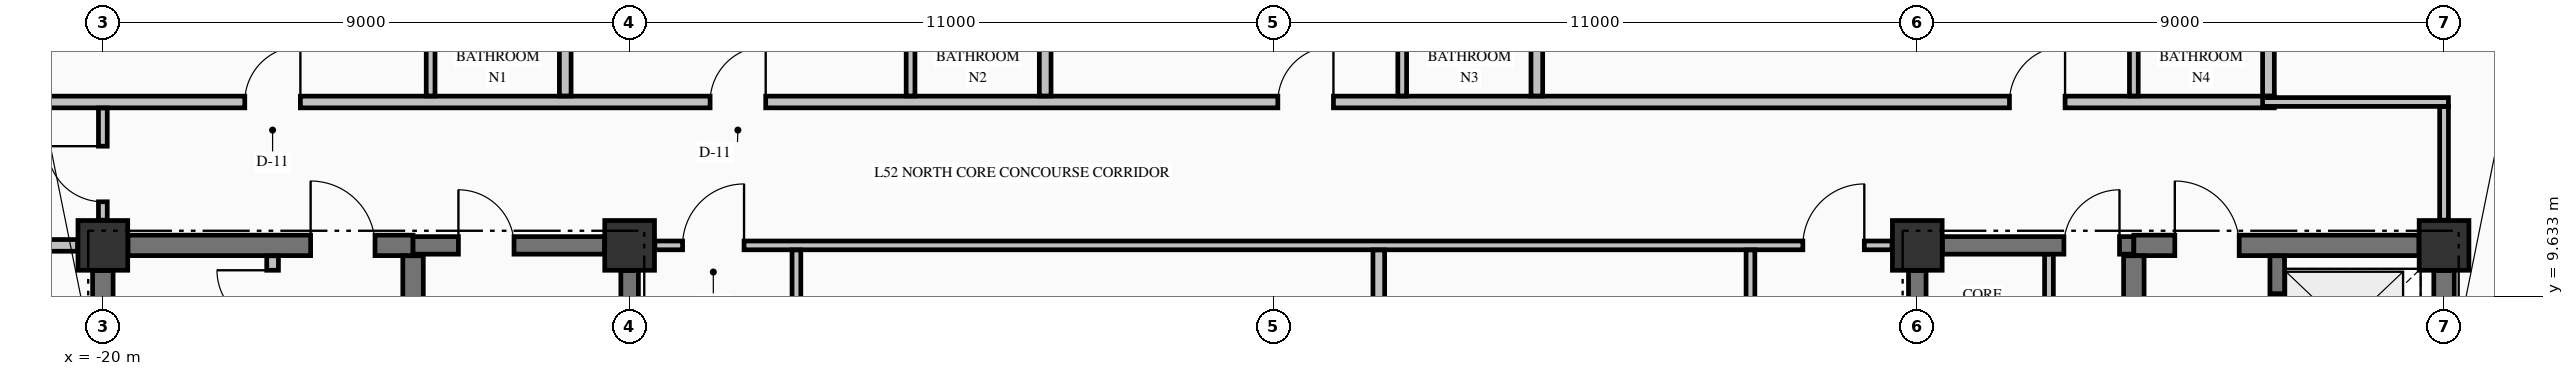
"""IFC4 building model, lengths in metres.
Left out: names, types, materials, properties, quantities, classifications, styles, units other than length and angle.
Written with IfcOpenShell. Run it as: python <this file> out.ifc"""

import sys

from ifc_helpers import new_model, si_unit, direction, frame, frame_2d, origin, origin_2d, place, context, subcontext, project, spatial, rectangle, extrude, element, fill, save


model = new_model("IFC4")
c1 = context("Model", 3, precision=1e-05, world=origin(), true_north=direction((0.0, 1.0)))
c2 = subcontext(c1, "Body", "Model", "MODEL_VIEW")
j1 = project(units=[si_unit("LENGTHUNIT", "METRE"), si_unit("PLANEANGLEUNIT", "RADIAN")], contexts=[c1])
p1 = place(None, origin())
s1 = spatial("IfcSite", under=j1, at=p1, CompositionType="ELEMENT")
p2 = place(p1, origin())
s2 = spatial("IfcBuilding", under=s1, at=p2, CompositionType="ELEMENT")
p3 = place(p2, frame((0.0, 0.0, 201.66)))
s3 = spatial("IfcBuildingStorey", under=s2, at=p3, CompositionType="ELEMENT", Elevation=201.66)
for number, where, z_axis, x_axis in (
    (1, (-20.0, 10.5, -0.25), (0.0, 0.0, 1.0), (1.0, 0.0, 0.0)),
    (2, (-11.0, 10.5, -0.25), (0.0, 0.0, 1.0), (1.0, 0.0, 0.0)),
    (3, (11.0, 10.5, -0.25), (0.0, 0.0, 1.0), (1.0, 0.0, 0.0)),
    (4, (20.0, 10.5, -0.25), (0.0, 0.0, 1.0), (1.0, 0.0, 0.0)),
):
    element("IfcColumn", number, at=place(p3, frame(where, z_axis=z_axis, x_axis=x_axis)), inside=s3, PredefinedType="COLUMN", context=c2, shape_type="SweptSolid", body=[
        extrude(rectangle(XDim=0.85, YDim=0.85, at=origin_2d()), origin(), (0.0, 0.0, 1.0), 3.4),
    ])
p4 = place(p3, frame((-19.571, 10.5, 0.0), z_axis=(0.0, 0.0, 1.0), x_axis=(1.0, 0.0, 0.0)))
e5 = element("IfcWall", 5, at=p4, inside=s3, PredefinedType="SHEAR", context=c2, shape_type="SweptSolid", body=[
    extrude(rectangle(XDim=4.871, YDim=0.35, at=frame_2d((2.436, 0.0))), origin(), (0.0, 0.0, 1.0), 3.15),
])
p5 = place(p4, frame((3.121, 0.0, 0.0)))
e6 = element("IfcOpeningElement", 6, at=p5, cuts=e5, PredefinedType="OPENING", context=c2, shape_type="SweptSolid", body=[
    extrude(rectangle(XDim=1.1, YDim=2.15, at=frame_2d((0.55, 1.075))), frame((0.0, 0.185, 0.0), z_axis=(0.0, -1.0, 0.0), x_axis=(1.0, 0.0, 0.0)), (0.0, 0.0, 1.0), 0.37),
])
p6 = place(p3, frame((-14.7, 10.5, 0.0), z_axis=(0.0, 0.0, 1.0), x_axis=(1.0, 0.0, 0.0)))
e7 = element("IfcWall", 7, at=p6, inside=s3, PredefinedType="SHEAR", context=c2, shape_type="SweptSolid", body=[
    extrude(rectangle(XDim=3.271, YDim=0.3, at=frame_2d((1.635, 0.0))), origin(), (0.0, 0.0, 1.0), 3.15),
])
p7 = place(p6, frame((0.775, 0.0, 0.0)))
e8 = element("IfcOpeningElement", 8, at=p7, cuts=e7, PredefinedType="OPENING", context=c2, shape_type="SweptSolid", body=[
    extrude(rectangle(XDim=0.95, YDim=2.15, at=frame_2d((0.475, 1.075))), frame((0.0, 0.16, 0.0), z_axis=(0.0, -1.0, 0.0), x_axis=(1.0, 0.0, 0.0)), (0.0, 0.0, 1.0), 0.32),
])
p8 = place(p3, frame((11.429, 10.5, 0.0), z_axis=(0.0, 0.0, 1.0), x_axis=(1.0, 0.0, 0.0)))
e9 = element("IfcWall", 9, at=p8, inside=s3, PredefinedType="SHEAR", context=c2, shape_type="SweptSolid", body=[
    extrude(rectangle(XDim=3.271, YDim=0.3, at=frame_2d((1.635, 0.0))), origin(), (0.0, 0.0, 1.0), 3.15),
])
p9 = place(p8, frame((2.076, 0.0, 0.0)))
e10 = element("IfcOpeningElement", 10, at=p9, cuts=e9, PredefinedType="OPENING", context=c2, shape_type="SweptSolid", body=[
    extrude(rectangle(XDim=0.95, YDim=2.15, at=frame_2d((0.475, 1.075))), frame((0.0, 0.16, 0.0), z_axis=(0.0, -1.0, 0.0), x_axis=(1.0, 0.0, 0.0)), (0.0, 0.0, 1.0), 0.32),
])
p10 = place(p3, frame((14.7, 10.5, 0.0), z_axis=(0.0, 0.0, 1.0), x_axis=(1.0, 0.0, 0.0)))
e11 = element("IfcWall", 11, at=p10, inside=s3, PredefinedType="SHEAR", context=c2, shape_type="SweptSolid", body=[
    extrude(rectangle(XDim=4.871, YDim=0.35, at=frame_2d((2.436, 0.0))), origin(), (0.0, 0.0, 1.0), 3.15),
])
p11 = place(p10, frame((0.7, 0.0, 0.0)))
e12 = element("IfcOpeningElement", 12, at=p11, cuts=e11, PredefinedType="OPENING", context=c2, shape_type="SweptSolid", body=[
    extrude(rectangle(XDim=1.1, YDim=2.15, at=frame_2d((0.55, 1.075))), frame((0.0, 0.185, 0.0), z_axis=(0.0, -1.0, 0.0), x_axis=(1.0, 0.0, 0.0)), (0.0, 0.0, 1.0), 0.37),
])
p12 = place(p3, frame((-26.835, 10.5, 0.0), z_axis=(0.0, 0.0, 1.0), x_axis=(1.0, 0.0, 0.0)))
e13 = element("IfcWall", 13, at=p12, inside=s3, PredefinedType="PARTITIONING", context=c2, shape_type="SweptSolid", body=[
    extrude(rectangle(XDim=6.404, YDim=0.2, at=frame_2d((3.202, 0.0))), origin(), (0.0, 0.0, 1.0), 3.15),
])
p13 = place(p12, frame((2.86, 0.0, 0.0)))
e14 = element("IfcOpeningElement", 14, at=p13, cuts=e13, PredefinedType="OPENING", context=c2, shape_type="SweptSolid", body=[
    extrude(rectangle(XDim=0.95, YDim=2.15, at=frame_2d((0.475, 1.075))), frame((0.0, 0.11, 0.0), z_axis=(0.0, -1.0, 0.0), x_axis=(1.0, 0.0, 0.0)), (0.0, 0.0, 1.0), 0.22),
])
p14 = place(p3, frame((-10.569, 10.5, 0.0), z_axis=(0.0, 0.0, 1.0), x_axis=(1.0, 0.0, 0.0)))
e15 = element("IfcWall", 15, at=p14, inside=s3, PredefinedType="PARTITIONING", context=c2, shape_type="SweptSolid", body=[
    extrude(rectangle(XDim=21.138, YDim=0.15, at=frame_2d((10.569, 0.0))), origin(), (0.0, 0.0, 1.0), 3.15),
])
p15 = place(p14, frame((0.474, 0.0, 0.0)))
e16 = element("IfcOpeningElement", 16, at=p15, cuts=e15, PredefinedType="OPENING", context=c2, shape_type="SweptSolid", body=[
    extrude(rectangle(XDim=1.05, YDim=2.15, at=frame_2d((0.525, 1.075))), frame((0.0, 0.085, 0.0), z_axis=(0.0, -1.0, 0.0), x_axis=(1.0, 0.0, 0.0)), (0.0, 0.0, 1.0), 0.17),
])
p16 = place(p14, frame((19.614, 0.0, 0.0)))
e17 = element("IfcOpeningElement", 17, at=p16, cuts=e15, PredefinedType="OPENING", context=c2, shape_type="SweptSolid", body=[
    extrude(rectangle(XDim=1.05, YDim=2.15, at=frame_2d((0.525, 1.075))), frame((0.0, 0.085, 0.0), z_axis=(0.0, -1.0, 0.0), x_axis=(1.0, 0.0, 0.0)), (0.0, 0.0, 1.0), 0.17),
])
p17 = place(p3, frame((-22.1, 12.95, 0.0), z_axis=(0.0, 0.0, 1.0), x_axis=(1.0, 0.0, 0.0)))
e18 = element("IfcWall", 18, at=p17, inside=s3, PredefinedType="PARTITIONING", context=c2, shape_type="SweptSolid", body=[
    extrude(rectangle(XDim=39.2, YDim=0.2, at=frame_2d((19.6, 0.0))), origin(), (0.0, 0.0, 1.0), 3.15),
])
p18 = place(p17, frame((4.525, 0.0, 0.0)))
e19 = element("IfcOpeningElement", 19, at=p18, cuts=e18, PredefinedType="OPENING", context=c2, shape_type="SweptSolid", body=[
    extrude(rectangle(XDim=0.95, YDim=2.15, at=frame_2d((0.475, 1.075))), frame((0.0, 0.11, 0.0), z_axis=(0.0, -1.0, 0.0), x_axis=(1.0, 0.0, 0.0)), (0.0, 0.0, 1.0), 0.22),
])
p19 = place(p17, frame((12.475, 0.0, 0.0)))
e20 = element("IfcOpeningElement", 20, at=p19, cuts=e18, PredefinedType="OPENING", context=c2, shape_type="SweptSolid", body=[
    extrude(rectangle(XDim=0.95, YDim=2.15, at=frame_2d((0.475, 1.075))), frame((0.0, 0.11, 0.0), z_axis=(0.0, -1.0, 0.0), x_axis=(1.0, 0.0, 0.0)), (0.0, 0.0, 1.0), 0.22),
])
p20 = place(p17, frame((22.175, 0.0, 0.0)))
e21 = element("IfcOpeningElement", 21, at=p20, cuts=e18, PredefinedType="OPENING", context=c2, shape_type="SweptSolid", body=[
    extrude(rectangle(XDim=0.95, YDim=2.15, at=frame_2d((0.475, 1.075))), frame((0.0, 0.11, 0.0), z_axis=(0.0, -1.0, 0.0), x_axis=(1.0, 0.0, 0.0)), (0.0, 0.0, 1.0), 0.22),
])
p21 = place(p17, frame((34.675, 0.0, 0.0)))
e22 = element("IfcOpeningElement", 22, at=p21, cuts=e18, PredefinedType="OPENING", context=c2, shape_type="SweptSolid", body=[
    extrude(rectangle(XDim=0.95, YDim=2.15, at=frame_2d((0.475, 1.075))), frame((0.0, 0.11, 0.0), z_axis=(0.0, -1.0, 0.0), x_axis=(1.0, 0.0, 0.0)), (0.0, 0.0, 1.0), 0.22),
])
p22 = place(p3, frame((16.9, 12.95, 0.0), z_axis=(0.0, 0.0, 1.0), x_axis=(1.0, 0.0, 0.0)))
e23 = element("IfcWall", 23, at=p22, inside=s3, PredefinedType="PARTITIONING", context=c2, shape_type="SweptSolid", body=[
    extrude(rectangle(XDim=3.175, YDim=0.15, at=frame_2d((1.587, 0.0))), origin(), (0.0, 0.0, 1.0), 3.15),
])
p23 = place(p3, frame((-20.0, 5.327, 0.0), z_axis=(0.0, 0.0, 1.0), x_axis=(0.0, 1.0, 0.0)))
e24 = element("IfcWall", 24, at=p23, inside=s3, PredefinedType="SHEAR", context=c2, shape_type="SweptSolid", body=[
    extrude(rectangle(XDim=4.744, YDim=0.35, at=frame_2d((2.372, 0.0))), origin(), (0.0, 0.0, 1.0), 3.15),
])
p24 = place(p3, frame((-14.7, 5.852, 0.0), z_axis=(0.0, 0.0, 1.0), x_axis=(0.0, 1.0, 0.0)))
e25 = element("IfcWall", 25, at=p24, inside=s3, PredefinedType="SHEAR", context=c2, shape_type="SweptSolid", body=[
    extrude(rectangle(XDim=4.471, YDim=0.35, at=frame_2d((2.235, 0.0))), origin(), (0.0, 0.0, 1.0), 3.15),
])
for number, where, z_axis, x_axis in (
    (26, (-11.0, 5.852, 0.0), (0.0, 0.0, 1.0), (0.0, 1.0, 0.0)),
    (27, (11.0, 5.852, 0.0), (0.0, 0.0, 1.0), (0.0, 1.0, 0.0)),
):
    element("IfcWall", number, at=place(p3, frame(where, z_axis=z_axis, x_axis=x_axis)), inside=s3, PredefinedType="SHEAR", context=c2, shape_type="SweptSolid", body=[
        extrude(rectangle(XDim=4.219, YDim=0.3, at=frame_2d((2.109, 0.0))), origin(), (0.0, 0.0, 1.0), 3.15),
    ])
p25 = place(p3, frame((14.7, 5.852, 0.0), z_axis=(0.0, 0.0, 1.0), x_axis=(0.0, 1.0, 0.0)))
e28 = element("IfcWall", 28, at=p25, inside=s3, PredefinedType="SHEAR", context=c2, shape_type="SweptSolid", body=[
    extrude(rectangle(XDim=4.471, YDim=0.35, at=frame_2d((2.235, 0.0))), origin(), (0.0, 0.0, 1.0), 3.15),
])
p26 = place(p3, frame((17.15, 7.877, 0.0), z_axis=(0.0, 0.0, 1.0), x_axis=(0.0, 1.0, 0.0)))
e29 = element("IfcWall", 29, at=p26, inside=s3, PredefinedType="SOLIDWALL", context=c2, shape_type="SweptSolid", body=[
    extrude(rectangle(XDim=2.446, YDim=0.25, at=frame_2d((1.223, 0.0))), origin(), (0.0, 0.0, 1.0), 3.15),
])
p27 = place(p26, frame((0.698, 0.0, 0.0)))
e30 = element("IfcOpeningElement", 30, at=p27, cuts=e29, PredefinedType="OPENING", context=c2, shape_type="SweptSolid", body=[
    extrude(rectangle(XDim=1.1, YDim=2.2, at=frame_2d((0.55, 1.1))), frame((0.0, 0.135, 0.0), z_axis=(0.0, -1.0, 0.0), x_axis=(1.0, 0.0, 0.0)), (0.0, 0.0, 1.0), 0.27),
])
p28 = place(p3, frame((20.0, 7.877, 0.0), z_axis=(0.0, 0.0, 1.0), x_axis=(0.0, 1.0, 0.0)))
e31 = element("IfcWall", 31, at=p28, inside=s3, PredefinedType="SHEAR", context=c2, shape_type="SweptSolid", body=[
    extrude(rectangle(XDim=2.194, YDim=0.35, at=frame_2d((1.097, 0.0))), origin(), (0.0, 0.0, 1.0), 3.15),
])
p29 = place(p3, frame((-20.0, 10.931, 0.0), z_axis=(0.0, 0.0, 1.0), x_axis=(0.0, 1.0, 0.0)))
e32 = element("IfcWall", 32, at=p29, inside=s3, PredefinedType="PARTITIONING", context=c2, shape_type="SweptSolid", body=[
    extrude(rectangle(XDim=1.916, YDim=0.15, at=frame_2d((0.958, 0.0))), origin(), (0.0, 0.0, 1.0), 2.342),
])
p30 = place(p29, frame((0.314, 0.0, 0.0)))
e33 = element("IfcOpeningElement", 33, at=p30, cuts=e32, PredefinedType="OPENING", context=c2, shape_type="SweptSolid", body=[
    extrude(rectangle(XDim=0.95, YDim=2.15, at=frame_2d((0.475, 1.075))), frame((0.0, 0.085, 0.0), z_axis=(0.0, -1.0, 0.0), x_axis=(1.0, 0.0, 0.0)), (0.0, 0.0, 1.0), 0.17),
])
p31 = place(p3, frame((-17.1, 8.778, 0.0), z_axis=(0.0, 0.0, 1.0), x_axis=(0.0, 1.0, 0.0)))
e34 = element("IfcWall", 34, at=p31, inside=s3, PredefinedType="PARTITIONING", context=c2, shape_type="SweptSolid", body=[
    extrude(rectangle(XDim=1.544, YDim=0.2, at=frame_2d((0.772, 0.0))), origin(), (0.0, 0.0, 1.0), 3.15),
])
p32 = place(p31, frame((0.347, 0.0, 0.0)))
e35 = element("IfcOpeningElement", 35, at=p32, cuts=e34, PredefinedType="OPENING", context=c2, shape_type="SweptSolid", body=[
    extrude(rectangle(XDim=0.95, YDim=2.15, at=frame_2d((0.475, 1.075))), frame((0.0, 0.11, 0.0), z_axis=(0.0, -1.0, 0.0), x_axis=(1.0, 0.0, 0.0)), (0.0, 0.0, 1.0), 0.22),
])
p33 = place(p3, frame((-14.4, 13.053, 0.0), z_axis=(0.0, 0.0, 1.0), x_axis=(0.0, 1.0, 0.0)))
e36 = element("IfcWall", 36, at=p33, inside=s3, PredefinedType="PARTITIONING", context=c2, shape_type="SweptSolid", body=[
    extrude(rectangle(XDim=2.669, YDim=0.15, at=frame_2d((1.334, 0.0))), origin(), (0.0, 0.0, 1.0), 3.15),
])
p34 = place(p3, frame((-12.1, 13.053, 0.0), z_axis=(0.0, 0.0, 1.0), x_axis=(0.0, 1.0, 0.0)))
e37 = element("IfcWall", 37, at=p34, inside=s3, PredefinedType="PARTITIONING", context=c2, shape_type="SweptSolid", body=[
    extrude(rectangle(XDim=2.669, YDim=0.2, at=frame_2d((1.334, 0.0))), origin(), (0.0, 0.0, 1.0), 3.15),
])
p35 = place(p3, frame((-8.15, 3.653, 0.0), z_axis=(0.0, 0.0, 1.0), x_axis=(0.0, 1.0, 0.0)))
e38 = element("IfcWall", 38, at=p35, inside=s3, PredefinedType="PARTITIONING", context=c2, shape_type="SweptSolid", body=[
    extrude(rectangle(XDim=6.769, YDim=0.15, at=frame_2d((3.385, 0.0))), origin(), (0.0, 0.0, 1.0), 3.15),
])
p36 = place(p35, frame((2.877, 0.0, 0.0)))
e39 = element("IfcOpeningElement", 39, at=p36, cuts=e38, PredefinedType="OPENING", context=c2, shape_type="SweptSolid", body=[
    extrude(rectangle(XDim=1.0, YDim=2.15, at=frame_2d((0.5, 1.075))), frame((0.0, 0.085, 0.0), z_axis=(0.0, -1.0, 0.0), x_axis=(1.0, 0.0, 0.0)), (0.0, 0.0, 1.0), 0.17),
])
p37 = place(p3, frame((-6.2, 13.053, 0.0), z_axis=(0.0, 0.0, 1.0), x_axis=(0.0, 1.0, 0.0)))
e40 = element("IfcWall", 40, at=p37, inside=s3, PredefinedType="PARTITIONING", context=c2, shape_type="SweptSolid", body=[
    extrude(rectangle(XDim=2.669, YDim=0.15, at=frame_2d((1.334, 0.0))), origin(), (0.0, 0.0, 1.0), 3.15),
])
p38 = place(p3, frame((-3.9, 13.053, 0.0), z_axis=(0.0, 0.0, 1.0), x_axis=(0.0, 1.0, 0.0)))
e41 = element("IfcWall", 41, at=p38, inside=s3, PredefinedType="PARTITIONING", context=c2, shape_type="SweptSolid", body=[
    extrude(rectangle(XDim=2.669, YDim=0.2, at=frame_2d((1.334, 0.0))), origin(), (0.0, 0.0, 1.0), 3.15),
])
p39 = place(p3, frame((1.8, 3.653, 0.0), z_axis=(0.0, 0.0, 1.0), x_axis=(0.0, 1.0, 0.0)))
e42 = element("IfcWall", 42, at=p39, inside=s3, PredefinedType="PARTITIONING", context=c2, shape_type="SweptSolid", body=[
    extrude(rectangle(XDim=6.769, YDim=0.2, at=frame_2d((3.385, 0.0))), origin(), (0.0, 0.0, 1.0), 3.15),
])
p40 = place(p3, frame((2.2, 13.053, 0.0), z_axis=(0.0, 0.0, 1.0), x_axis=(0.0, 1.0, 0.0)))
e43 = element("IfcWall", 43, at=p40, inside=s3, PredefinedType="PARTITIONING", context=c2, shape_type="SweptSolid", body=[
    extrude(rectangle(XDim=2.669, YDim=0.15, at=frame_2d((1.334, 0.0))), origin(), (0.0, 0.0, 1.0), 3.15),
])
p41 = place(p3, frame((4.5, 13.053, 0.0), z_axis=(0.0, 0.0, 1.0), x_axis=(0.0, 1.0, 0.0)))
e44 = element("IfcWall", 44, at=p41, inside=s3, PredefinedType="PARTITIONING", context=c2, shape_type="SweptSolid", body=[
    extrude(rectangle(XDim=2.669, YDim=0.2, at=frame_2d((1.334, 0.0))), origin(), (0.0, 0.0, 1.0), 3.15),
])
p42 = place(p3, frame((8.15, -2.097, 0.0), z_axis=(0.0, 0.0, 1.0), x_axis=(0.0, 1.0, 0.0)))
e45 = element("IfcWall", 45, at=p42, inside=s3, PredefinedType="PARTITIONING", context=c2, shape_type="SweptSolid", body=[
    extrude(rectangle(XDim=12.519, YDim=0.15, at=frame_2d((6.26, 0.0))), origin(), (0.0, 0.0, 1.0), 3.15),
])
p43 = place(p42, frame((5.697, 0.0, 0.0)))
e46 = element("IfcOpeningElement", 46, at=p43, cuts=e45, PredefinedType="OPENING", context=c2, shape_type="SweptSolid", body=[
    extrude(rectangle(XDim=1.1, YDim=2.15, at=frame_2d((0.55, 1.075))), frame((0.0, 0.085, 0.0), z_axis=(0.0, -1.0, 0.0), x_axis=(1.0, 0.0, 0.0)), (0.0, 0.0, 1.0), 0.17),
])
p44 = place(p3, frame((13.25, 5.853, 0.0), z_axis=(0.0, 0.0, 1.0), x_axis=(0.0, 1.0, 0.0)))
e47 = element("IfcWall", 47, at=p44, inside=s3, PredefinedType="PARTITIONING", context=c2, shape_type="SweptSolid", body=[
    extrude(rectangle(XDim=4.494, YDim=0.15, at=frame_2d((2.247, 0.0))), origin(), (0.0, 0.0, 1.0), 3.15),
])
p45 = place(p44, frame((1.472, 0.0, 0.0)))
e48 = element("IfcOpeningElement", 48, at=p45, cuts=e47, PredefinedType="OPENING", context=c2, shape_type="SweptSolid", body=[
    extrude(rectangle(XDim=0.95, YDim=2.15, at=frame_2d((0.475, 1.075))), frame((0.0, 0.085, 0.0), z_axis=(0.0, -1.0, 0.0), x_axis=(1.0, 0.0, 0.0)), (0.0, 0.0, 1.0), 0.17),
])
p46 = place(p3, frame((14.7, 13.053, 0.0), z_axis=(0.0, 0.0, 1.0), x_axis=(0.0, 1.0, 0.0)))
e49 = element("IfcWall", 49, at=p46, inside=s3, PredefinedType="PARTITIONING", context=c2, shape_type="SweptSolid", body=[
    extrude(rectangle(XDim=2.669, YDim=0.15, at=frame_2d((1.334, 0.0))), origin(), (0.0, 0.0, 1.0), 3.15),
])
p47 = place(p3, frame((17.0, 13.053, 0.0), z_axis=(0.0, 0.0, 1.0), x_axis=(0.0, 1.0, 0.0)))
e50 = element("IfcWall", 50, at=p47, inside=s3, PredefinedType="PARTITIONING", context=c2, shape_type="SweptSolid", body=[
    extrude(rectangle(XDim=2.669, YDim=0.2, at=frame_2d((1.334, 0.0))), origin(), (0.0, 0.0, 1.0), 3.15),
])
p48 = place(p3, frame((20.0, 10.931, 0.0), z_axis=(0.0, 0.0, 1.0), x_axis=(0.0, 1.0, 0.0)))
e51 = element("IfcWall", 51, at=p48, inside=s3, PredefinedType="PARTITIONING", context=c2, shape_type="SweptSolid", body=[
    extrude(rectangle(XDim=1.941, YDim=0.15, at=frame_2d((0.971, 0.0))), origin(), (0.0, 0.0, 1.0), 2.342),
])
p49 = place(p7, origin())
e52 = element("IfcDoor", 52, at=p49, inside=s3, OperationType="SINGLE_SWING_LEFT", PredefinedType="DOOR", context=c2, shape_type="SweptSolid", body=[
    extrude(rectangle(XDim=0.95, YDim=2.15, at=frame_2d((0.475, 1.075))), frame((0.0, 0.025, 0.0), z_axis=(0.0, -1.0, 0.0), x_axis=(1.0, 0.0, 0.0)), (0.0, 0.0, 1.0), 0.05),
])
fill(e8, e52)
p50 = place(p9, origin())
e53 = element("IfcDoor", 53, at=p50, inside=s3, OperationType="SINGLE_SWING_RIGHT", PredefinedType="DOOR", context=c2, shape_type="SweptSolid", body=[
    extrude(rectangle(XDim=0.95, YDim=2.15, at=frame_2d((0.475, 1.075))), frame((0.0, 0.025, 0.0), z_axis=(0.0, -1.0, 0.0), x_axis=(1.0, 0.0, 0.0)), (0.0, 0.0, 1.0), 0.05),
])
fill(e10, e53)
p51 = place(p5, origin())
e54 = element("IfcDoor", 54, at=p51, inside=s3, OperationType="SINGLE_SWING_LEFT", PredefinedType="DOOR", context=c2, shape_type="SweptSolid", body=[
    extrude(rectangle(XDim=1.1, YDim=2.15, at=frame_2d((0.55, 1.075))), frame((0.0, 0.025, 0.0), z_axis=(0.0, -1.0, 0.0), x_axis=(1.0, 0.0, 0.0)), (0.0, 0.0, 1.0), 0.05),
])
fill(e6, e54)
p52 = place(p32, origin())
e55 = element("IfcDoor", 55, at=p52, inside=s3, OperationType="SINGLE_SWING_RIGHT", PredefinedType="DOOR", context=c2, shape_type="SweptSolid", body=[
    extrude(rectangle(XDim=0.95, YDim=2.15, at=frame_2d((0.475, 1.075))), frame((0.0, 0.025, 0.0), z_axis=(0.0, -1.0, 0.0), x_axis=(1.0, 0.0, 0.0)), (0.0, 0.0, 1.0), 0.05),
])
fill(e35, e55)
p53 = place(p27, origin())
e56 = element("IfcDoor", 56, at=p53, inside=s3, OperationType="SLIDING_TO_RIGHT", PredefinedType="DOOR", context=c2, shape_type="SweptSolid", body=[
    extrude(rectangle(XDim=1.1, YDim=2.2, at=frame_2d((0.55, 1.1))), frame((0.0, 0.025, 0.0), z_axis=(0.0, -1.0, 0.0), x_axis=(1.0, 0.0, 0.0)), (0.0, 0.0, 1.0), 0.05),
])
fill(e30, e56)
p54 = place(p11, origin())
e57 = element("IfcDoor", 57, at=p54, inside=s3, OperationType="SINGLE_SWING_LEFT", PredefinedType="DOOR", context=c2, shape_type="SweptSolid", body=[
    extrude(rectangle(XDim=1.1, YDim=2.15, at=frame_2d((0.55, 1.075))), frame((0.0, 0.025, 0.0), z_axis=(0.0, -1.0, 0.0), x_axis=(1.0, 0.0, 0.0)), (0.0, 0.0, 1.0), 0.05),
])
fill(e12, e57)
p55 = place(p15, origin())
e58 = element("IfcDoor", 58, at=p55, inside=s3, OperationType="SINGLE_SWING_RIGHT", PredefinedType="DOOR", context=c2, shape_type="SweptSolid", body=[
    extrude(rectangle(XDim=1.05, YDim=2.15, at=frame_2d((0.525, 1.075))), frame((0.0, 0.025, 0.0), z_axis=(0.0, -1.0, 0.0), x_axis=(1.0, 0.0, 0.0)), (0.0, 0.0, 1.0), 0.05),
])
fill(e16, e58)
p56 = place(p16, origin())
e59 = element("IfcDoor", 59, at=p56, inside=s3, OperationType="SINGLE_SWING_RIGHT", PredefinedType="DOOR", context=c2, shape_type="SweptSolid", body=[
    extrude(rectangle(XDim=1.05, YDim=2.15, at=frame_2d((0.525, 1.075))), frame((0.0, 0.025, 0.0), z_axis=(0.0, -1.0, 0.0), x_axis=(1.0, 0.0, 0.0)), (0.0, 0.0, 1.0), 0.05),
])
fill(e17, e59)
p57 = place(p18, origin())
e60 = element("IfcDoor", 60, at=p57, inside=s3, OperationType="SINGLE_SWING_RIGHT", PredefinedType="DOOR", context=c2, shape_type="SweptSolid", body=[
    extrude(rectangle(XDim=0.95, YDim=2.15, at=frame_2d((0.475, 1.075))), frame((0.0, 0.025, 0.0), z_axis=(0.0, -1.0, 0.0), x_axis=(1.0, 0.0, 0.0)), (0.0, 0.0, 1.0), 0.05),
])
fill(e19, e60)
p58 = place(p19, origin())
e61 = element("IfcDoor", 61, at=p58, inside=s3, OperationType="SINGLE_SWING_RIGHT", PredefinedType="DOOR", context=c2, shape_type="SweptSolid", body=[
    extrude(rectangle(XDim=0.95, YDim=2.15, at=frame_2d((0.475, 1.075))), frame((0.0, 0.025, 0.0), z_axis=(0.0, -1.0, 0.0), x_axis=(1.0, 0.0, 0.0)), (0.0, 0.0, 1.0), 0.05),
])
fill(e20, e61)
p59 = place(p20, origin())
e62 = element("IfcDoor", 62, at=p59, inside=s3, OperationType="SINGLE_SWING_RIGHT", PredefinedType="DOOR", context=c2, shape_type="SweptSolid", body=[
    extrude(rectangle(XDim=0.95, YDim=2.15, at=frame_2d((0.475, 1.075))), frame((0.0, 0.025, 0.0), z_axis=(0.0, -1.0, 0.0), x_axis=(1.0, 0.0, 0.0)), (0.0, 0.0, 1.0), 0.05),
])
fill(e21, e62)
p60 = place(p21, origin())
e63 = element("IfcDoor", 63, at=p60, inside=s3, OperationType="SINGLE_SWING_RIGHT", PredefinedType="DOOR", context=c2, shape_type="SweptSolid", body=[
    extrude(rectangle(XDim=0.95, YDim=2.15, at=frame_2d((0.475, 1.075))), frame((0.0, 0.025, 0.0), z_axis=(0.0, -1.0, 0.0), x_axis=(1.0, 0.0, 0.0)), (0.0, 0.0, 1.0), 0.05),
])
fill(e22, e63)
p61 = place(p30, origin())
e64 = element("IfcDoor", 64, at=p61, inside=s3, OperationType="SINGLE_SWING_RIGHT", PredefinedType="DOOR", context=c2, shape_type="SweptSolid", body=[
    extrude(rectangle(XDim=0.95, YDim=2.15, at=frame_2d((0.475, 1.075))), frame((0.0, 0.025, 0.0), z_axis=(0.0, -1.0, 0.0), x_axis=(1.0, 0.0, 0.0)), (0.0, 0.0, 1.0), 0.05),
])
fill(e33, e64)
save(model, sys.argv[1])
